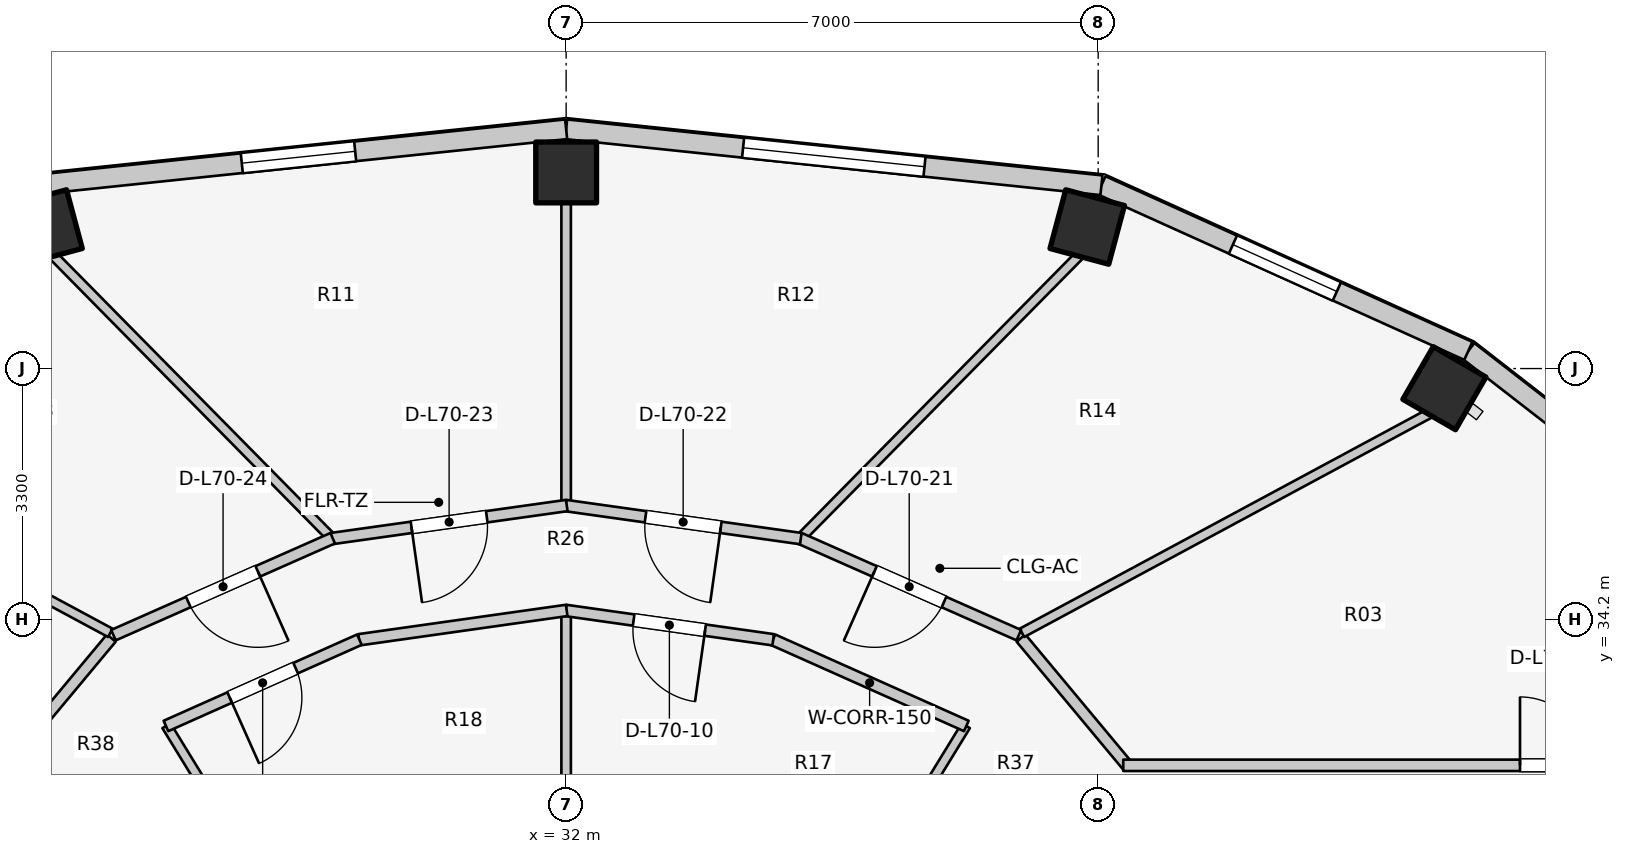
"""IFC4 building model, lengths in metres.
Left out: names, types, materials, properties, quantities, classifications, styles, units other than length and angle.
Written with IfcOpenShell. Run it as: python <this file> out.ifc"""

import sys

from ifc_helpers import new_model, si_unit, direction, frame, frame_2d, origin, origin_2d, place, context, subcontext, project, spatial, rectangle, extrude, element, fill, save


model = new_model("IFC4")
c1 = context("Model", 3, precision=1e-05, world=origin(), true_north=direction((0.0, 1.0)))
c2 = subcontext(c1, "Body", "Model", "MODEL_VIEW")
j1 = project(units=[si_unit("LENGTHUNIT", "METRE"), si_unit("PLANEANGLEUNIT", "RADIAN")], contexts=[c1])
p1 = place(None, origin())
s1 = spatial("IfcSite", under=j1, at=p1, CompositionType="ELEMENT")
p2 = place(p1, origin())
s2 = spatial("IfcBuilding", under=s1, at=p2, CompositionType="ELEMENT")
p3 = place(p2, frame((0.0, 0.0, 229.5)))
s3 = spatial("IfcBuildingStorey", under=s2, at=p3, CompositionType="ELEMENT", Elevation=229.5)
for number, where, z_axis, x_axis in (
    (1, (43.555, 37.241, 0.0), (0.0, 0.0, 1.0), (0.5, 0.866, 0.0)),
    (2, (38.856, 39.362, 0.0), (0.0, 0.0, 1.0), (0.259, 0.966, 0.0)),
    (3, (32.0, 40.08, 0.0), (0.0, 0.0, 1.0), (0.0, 1.0, 0.0)),
    (4, (25.144, 39.362, 0.0), (0.0, 0.0, 1.0), (-0.259, 0.966, 0.0)),
):
    element("IfcColumn", number, at=place(p3, frame(where, z_axis=z_axis, x_axis=x_axis)), inside=s3, PredefinedType="COLUMN", context=c2, shape_type="SweptSolid", body=[
        extrude(rectangle(XDim=0.8, YDim=0.8, at=origin_2d()), origin(), (0.0, 0.0, 1.0), 3.1),
    ])
p4 = place(p3, frame((47.558, 34.872, 0.0), z_axis=(0.0, 0.0, 1.0), x_axis=(-0.790126214723, 0.612944177563, 0.0)))
e5 = element("IfcWall", 5, at=p4, inside=s3, PredefinedType="STANDARD", context=c2, shape_type="SweptSolid", body=[
    extrude(rectangle(XDim=4.667, YDim=0.26, at=frame_2d((2.333, 0.0))), origin(), (0.0, 0.0, 1.0), 2.85),
])
p5 = place(p3, frame((43.87, 37.733, 0.0), z_axis=(0.0, 0.0, 1.0), x_axis=(-0.911427484938, 0.411460738952, 0.0)))
e6 = element("IfcWall", 6, at=p5, inside=s3, PredefinedType="STANDARD", context=c2, shape_type="SweptSolid", body=[
    extrude(rectangle(XDim=5.296, YDim=0.26, at=frame_2d((2.648, 0.0))), origin(), (0.0, 0.0, 1.0), 2.85),
])
p6 = place(p5, frame((1.898, 0.0, 0.75)))
e7 = element("IfcOpeningElement", 7, at=p6, cuts=e6, PredefinedType="OPENING", context=c2, shape_type="SweptSolid", body=[
    extrude(rectangle(XDim=1.5, YDim=1.6, at=frame_2d((0.75, 0.8))), frame((0.0, 0.14, 0.0), z_axis=(0.0, -1.0, 0.0), x_axis=(1.0, 0.0, 0.0)), (0.0, 0.0, 1.0), 0.28),
])
p7 = place(p3, frame((39.043, 39.912, 0.0), z_axis=(0.0, 0.0, 1.0), x_axis=(-0.994582822721, 0.103947144014, 0.0)))
e8 = element("IfcWall", 8, at=p7, inside=s3, PredefinedType="STANDARD", context=c2, shape_type="SweptSolid", body=[
    extrude(rectangle(XDim=7.081, YDim=0.26, at=frame_2d((3.541, 0.0))), origin(), (0.0, 0.0, 1.0), 2.85),
])
p8 = place(p7, frame((2.341, 0.0, 0.75)))
e9 = element("IfcOpeningElement", 9, at=p8, cuts=e8, PredefinedType="OPENING", context=c2, shape_type="SweptSolid", body=[
    extrude(rectangle(XDim=2.4, YDim=1.7, at=frame_2d((1.2, 0.85))), frame((0.0, 0.14, 0.0), z_axis=(0.0, -1.0, 0.0), x_axis=(1.0, 0.0, 0.0)), (0.0, 0.0, 1.0), 0.28),
])
p9 = place(p3, frame((32.0, 40.648, 0.0), z_axis=(0.0, 0.0, 1.0), x_axis=(-0.994582822721, -0.103947144014, 0.0)))
e10 = element("IfcWall", 10, at=p9, inside=s3, PredefinedType="STANDARD", context=c2, shape_type="SweptSolid", body=[
    extrude(rectangle(XDim=7.081, YDim=0.26, at=frame_2d((3.541, 0.0))), origin(), (0.0, 0.0, 1.0), 2.85),
])
p10 = place(p9, frame((2.791, 0.0, 0.75)))
e11 = element("IfcOpeningElement", 11, at=p10, cuts=e10, PredefinedType="OPENING", context=c2, shape_type="SweptSolid", body=[
    extrude(rectangle(XDim=1.5, YDim=1.6, at=frame_2d((0.75, 0.8))), frame((0.0, 0.14, 0.0), z_axis=(0.0, -1.0, 0.0), x_axis=(1.0, 0.0, 0.0)), (0.0, 0.0, 1.0), 0.28),
])
p11 = place(p3, frame((35.55, 30.015, 0.0), z_axis=(0.0, 0.0, 1.0), x_axis=(0.522763432117, 0.852477796802, 0.0)))
e12 = element("IfcWall", 12, at=p11, inside=s3, PredefinedType="PARTITIONING", context=c2, shape_type="SweptSolid", body=[
    extrude(rectangle(XDim=3.269, YDim=0.125, at=frame_2d((1.635, 0.0))), origin(), (0.0, 0.0, 1.0), 2.376),
])
p12 = place(p3, frame((32.0, 31.1, 0.0), z_axis=(0.0, 0.0, 1.0), x_axis=(0.0, 1.0, 0.0)))
e13 = element("IfcWall", 13, at=p12, inside=s3, PredefinedType="PARTITIONING", context=c2, shape_type="SweptSolid", body=[
    extrude(rectangle(XDim=3.218, YDim=0.125, at=frame_2d((1.609, 0.0))), origin(), (0.0, 0.0, 1.0), 2.376),
])
p13 = place(p3, frame((28.45, 30.015, 0.0), z_axis=(0.0, 0.0, 1.0), x_axis=(-0.522763432117, 0.852477796802, 0.0)))
e14 = element("IfcWall", 14, at=p13, inside=s3, PredefinedType="PARTITIONING", context=c2, shape_type="SweptSolid", body=[
    extrude(rectangle(XDim=3.269, YDim=0.125, at=frame_2d((1.635, 0.0))), origin(), (0.0, 0.0, 1.0), 2.376),
])
p14 = place(p3, frame((37.265, 32.798, 0.0), z_axis=(0.0, 0.0, 1.0), x_axis=(-0.913254317828, 0.407389924971, 0.0)))
e15 = element("IfcWall", 15, at=p14, inside=s3, PredefinedType="PARTITIONING", context=c2, shape_type="SweptSolid", body=[
    extrude(rectangle(XDim=2.787, YDim=0.15, at=frame_2d((1.393, 0.0))), origin(), (0.0, 0.0, 1.0), 2.376),
])
p15 = place(p3, frame((34.724, 33.932, 0.0), z_axis=(0.0, 0.0, 1.0), x_axis=(-0.990150268487, 0.140008734782, 0.0)))
e16 = element("IfcWall", 16, at=p15, inside=s3, PredefinedType="PARTITIONING", context=c2, shape_type="SweptSolid", body=[
    extrude(rectangle(XDim=2.759, YDim=0.15, at=frame_2d((1.379, 0.0))), origin(), (0.0, 0.0, 1.0), 2.376),
])
p16 = place(p15, frame((0.904, 0.0, 0.0)))
e17 = element("IfcOpeningElement", 17, at=p16, cuts=e16, PredefinedType="OPENING", context=c2, shape_type="SweptSolid", body=[
    extrude(rectangle(XDim=0.95, YDim=2.1, at=frame_2d((0.475, 1.05))), frame((0.0, 0.085, 0.0), z_axis=(0.0, -1.0, 0.0), x_axis=(1.0, 0.0, 0.0)), (0.0, 0.0, 1.0), 0.17),
])
p17 = place(p3, frame((32.007, 34.318, 0.0), z_axis=(0.0, 0.0, 1.0), x_axis=(-0.990150268487, -0.140008734782, 0.0)))
e18 = element("IfcWall", 18, at=p17, inside=s3, PredefinedType="PARTITIONING", context=c2, shape_type="SweptSolid", body=[
    extrude(rectangle(XDim=2.759, YDim=0.15, at=frame_2d((1.379, 0.0))), origin(), (0.0, 0.0, 1.0), 2.376),
])
p18 = place(p3, frame((29.28, 33.933, 0.0), z_axis=(0.0, 0.0, 1.0), x_axis=(-0.913254317828, -0.407389924971, 0.0)))
e19 = element("IfcWall", 19, at=p18, inside=s3, PredefinedType="PARTITIONING", context=c2, shape_type="SweptSolid", body=[
    extrude(rectangle(XDim=2.787, YDim=0.15, at=frame_2d((1.393, 0.0))), origin(), (0.0, 0.0, 1.0), 2.376),
])
p19 = place(p18, frame((0.918, 0.0, 0.0)))
e20 = element("IfcOpeningElement", 20, at=p19, cuts=e19, PredefinedType="OPENING", context=c2, shape_type="SweptSolid", body=[
    extrude(rectangle(XDim=0.95, YDim=2.1, at=frame_2d((0.475, 1.05))), frame((0.0, 0.085, 0.0), z_axis=(0.0, -1.0, 0.0), x_axis=(1.0, 0.0, 0.0)), (0.0, 0.0, 1.0), 0.17),
])
p20 = place(p3, frame((37.984, 33.955, 0.0), z_axis=(0.0, 0.0, 1.0), x_axis=(0.64030392053, -0.76812166312, 0.0)))
e21 = element("IfcWall", 21, at=p20, inside=s3, PredefinedType="PARTITIONING", context=c2, shape_type="SweptSolid", body=[
    extrude(rectangle(XDim=2.21, YDim=0.15, at=frame_2d((1.105, 0.0))), origin(), (0.0, 0.0, 1.0), 2.376),
])
p21 = place(p3, frame((39.33, 32.28, 0.0), z_axis=(0.0, 0.0, 1.0), x_axis=(1.0, 0.0, 0.0)))
e22 = element("IfcWall", 22, at=p21, inside=s3, PredefinedType="PARTITIONING", context=c2, shape_type="SweptSolid", body=[
    extrude(rectangle(XDim=7.52, YDim=0.15, at=frame_2d((3.76, 0.0))), origin(), (0.0, 0.0, 1.0), 2.376),
])
p22 = place(p21, frame((5.22, 0.0, 0.0)))
e23 = element("IfcOpeningElement", 23, at=p22, cuts=e22, PredefinedType="OPENING", context=c2, shape_type="SweptSolid", body=[
    extrude(rectangle(XDim=0.9, YDim=2.1, at=frame_2d((0.45, 1.05))), frame((0.0, 0.085, 0.0), z_axis=(0.0, -1.0, 0.0), x_axis=(1.0, 0.0, 0.0)), (0.0, 0.0, 1.0), 0.17),
])
p23 = place(p3, frame((26.016, 33.955, 0.0), z_axis=(0.0, 0.0, 1.0), x_axis=(-0.64030392053, -0.76812166312, 0.0)))
e24 = element("IfcWall", 24, at=p23, inside=s3, PredefinedType="PARTITIONING", context=c2, shape_type="SweptSolid", body=[
    extrude(rectangle(XDim=2.21, YDim=0.15, at=frame_2d((1.105, 0.0))), origin(), (0.0, 0.0, 1.0), 2.376),
])
p24 = place(p3, frame((37.997, 34.023, 0.0), z_axis=(0.0, 0.0, 1.0), x_axis=(0.880531534665, 0.473987569943, 0.0)))
e25 = element("IfcWall", 25, at=p24, inside=s3, PredefinedType="PARTITIONING", context=c2, shape_type="SweptSolid", body=[
    extrude(rectangle(XDim=6.096, YDim=0.125, at=frame_2d((3.048, 0.0))), origin(), (0.0, 0.0, 1.0), 2.376),
])
p25 = place(p3, frame((35.118, 35.304, 0.0), z_axis=(0.0, 0.0, 1.0), x_axis=(0.702191571271, 0.711988059756, 0.0)))
e26 = element("IfcWall", 26, at=p25, inside=s3, PredefinedType="PARTITIONING", context=c2, shape_type="SweptSolid", body=[
    extrude(rectangle(XDim=5.184, YDim=0.125, at=frame_2d((2.592, 0.0))), origin(), (0.0, 0.0, 1.0), 2.376),
])
p26 = place(p3, frame((32.0, 35.753, 0.0), z_axis=(0.0, 0.0, 1.0), x_axis=(0.0, 1.0, 0.0)))
e27 = element("IfcWall", 27, at=p26, inside=s3, PredefinedType="PARTITIONING", context=c2, shape_type="SweptSolid", body=[
    extrude(rectangle(XDim=3.947, YDim=0.125, at=frame_2d((1.974, 0.0))), origin(), (0.0, 0.0, 1.0), 2.376),
])
p27 = place(p3, frame((28.882, 35.304, 0.0), z_axis=(0.0, 0.0, 1.0), x_axis=(-0.702191571271, 0.711988059756, 0.0)))
e28 = element("IfcWall", 28, at=p27, inside=s3, PredefinedType="PARTITIONING", context=c2, shape_type="SweptSolid", body=[
    extrude(rectangle(XDim=5.184, YDim=0.125, at=frame_2d((2.592, 0.0))), origin(), (0.0, 0.0, 1.0), 2.376),
])
p28 = place(p3, frame((26.003, 34.023, 0.0), z_axis=(0.0, 0.0, 1.0), x_axis=(-0.880531534665, 0.473987569943, 0.0)))
e29 = element("IfcWall", 29, at=p28, inside=s3, PredefinedType="PARTITIONING", context=c2, shape_type="SweptSolid", body=[
    extrude(rectangle(XDim=6.096, YDim=0.125, at=frame_2d((3.048, 0.0))), origin(), (0.0, 0.0, 1.0), 2.376),
])
p29 = place(p3, frame((37.956, 33.992, 0.0), z_axis=(0.0, 0.0, 1.0), x_axis=(-0.914642679993, 0.404263240891, 0.0)))
e30 = element("IfcWall", 30, at=p29, inside=s3, PredefinedType="PARTITIONING", context=c2, shape_type="SweptSolid", body=[
    extrude(rectangle(XDim=3.154, YDim=0.15, at=frame_2d((1.577, 0.0))), origin(), (0.0, 0.0, 1.0), 2.376),
])
p30 = place(p29, frame((1.077, 0.0, 0.0)))
e31 = element("IfcOpeningElement", 31, at=p30, cuts=e30, PredefinedType="OPENING", context=c2, shape_type="SweptSolid", body=[
    extrude(rectangle(XDim=1.0, YDim=2.1, at=frame_2d((0.5, 1.05))), frame((0.0, 0.085, 0.0), z_axis=(0.0, -1.0, 0.0), x_axis=(1.0, 0.0, 0.0)), (0.0, 0.0, 1.0), 0.17),
])
p31 = place(p3, frame((35.087, 35.263, 0.0), z_axis=(0.0, 0.0, 1.0), x_axis=(-0.990268690673, 0.139168675614, 0.0)))
e32 = element("IfcWall", 32, at=p31, inside=s3, PredefinedType="PARTITIONING", context=c2, shape_type="SweptSolid", body=[
    extrude(rectangle(XDim=3.126, YDim=0.15, at=frame_2d((1.563, 0.0))), origin(), (0.0, 0.0, 1.0), 2.376),
])
p32 = place(p31, frame((1.063, 0.0, 0.0)))
e33 = element("IfcOpeningElement", 33, at=p32, cuts=e32, PredefinedType="OPENING", context=c2, shape_type="SweptSolid", body=[
    extrude(rectangle(XDim=1.0, YDim=2.1, at=frame_2d((0.5, 1.05))), frame((0.0, 0.085, 0.0), z_axis=(0.0, -1.0, 0.0), x_axis=(1.0, 0.0, 0.0)), (0.0, 0.0, 1.0), 0.17),
])
p33 = place(p3, frame((32.008, 35.698, 0.0), z_axis=(0.0, 0.0, 1.0), x_axis=(-0.990268690673, -0.139168675614, 0.0)))
e34 = element("IfcWall", 34, at=p33, inside=s3, PredefinedType="PARTITIONING", context=c2, shape_type="SweptSolid", body=[
    extrude(rectangle(XDim=3.126, YDim=0.15, at=frame_2d((1.563, 0.0))), origin(), (0.0, 0.0, 1.0), 2.376),
])
p34 = place(p33, frame((1.063, 0.0, 0.0)))
e35 = element("IfcOpeningElement", 35, at=p34, cuts=e34, PredefinedType="OPENING", context=c2, shape_type="SweptSolid", body=[
    extrude(rectangle(XDim=1.0, YDim=2.1, at=frame_2d((0.5, 1.05))), frame((0.0, 0.085, 0.0), z_axis=(0.0, -1.0, 0.0), x_axis=(1.0, 0.0, 0.0)), (0.0, 0.0, 1.0), 0.17),
])
p35 = place(p3, frame((28.929, 35.268, 0.0), z_axis=(0.0, 0.0, 1.0), x_axis=(-0.914642679993, -0.404263240891, 0.0)))
e36 = element("IfcWall", 36, at=p35, inside=s3, PredefinedType="PARTITIONING", context=c2, shape_type="SweptSolid", body=[
    extrude(rectangle(XDim=3.154, YDim=0.15, at=frame_2d((1.577, 0.0))), origin(), (0.0, 0.0, 1.0), 2.376),
])
p36 = place(p35, frame((1.077, 0.0, 0.0)))
e37 = element("IfcOpeningElement", 37, at=p36, cuts=e36, PredefinedType="OPENING", context=c2, shape_type="SweptSolid", body=[
    extrude(rectangle(XDim=1.0, YDim=2.1, at=frame_2d((0.5, 1.05))), frame((0.0, 0.085, 0.0), z_axis=(0.0, -1.0, 0.0), x_axis=(1.0, 0.0, 0.0)), (0.0, 0.0, 1.0), 0.17),
])
p37 = place(p6, origin())
e38 = element("IfcWindow", 38, at=p37, inside=s3, PartitioningType="SINGLE_PANEL", PredefinedType="WINDOW", context=c2, shape_type="SweptSolid", body=[
    extrude(rectangle(XDim=1.5, YDim=1.6, at=frame_2d((0.75, 0.8))), frame((0.0, 0.03, 0.0), z_axis=(0.0, -1.0, 0.0), x_axis=(1.0, 0.0, 0.0)), (0.0, 0.0, 1.0), 0.06),
])
fill(e7, e38)
p38 = place(p8, origin())
e39 = element("IfcWindow", 39, at=p38, inside=s3, PartitioningType="SINGLE_PANEL", PredefinedType="WINDOW", context=c2, shape_type="SweptSolid", body=[
    extrude(rectangle(XDim=2.4, YDim=1.7, at=frame_2d((1.2, 0.85))), frame((0.0, 0.03, 0.0), z_axis=(0.0, -1.0, 0.0), x_axis=(1.0, 0.0, 0.0)), (0.0, 0.0, 1.0), 0.06),
])
fill(e9, e39)
p39 = place(p10, origin())
e40 = element("IfcWindow", 40, at=p39, inside=s3, PartitioningType="SINGLE_PANEL", PredefinedType="WINDOW", context=c2, shape_type="SweptSolid", body=[
    extrude(rectangle(XDim=1.5, YDim=1.6, at=frame_2d((0.75, 0.8))), frame((0.0, 0.03, 0.0), z_axis=(0.0, -1.0, 0.0), x_axis=(1.0, 0.0, 0.0)), (0.0, 0.0, 1.0), 0.06),
])
fill(e11, e40)
p40 = place(p16, origin())
e41 = element("IfcDoor", 41, at=p40, inside=s3, OperationType="SINGLE_SWING_LEFT", PredefinedType="DOOR", context=c2, shape_type="SweptSolid", body=[
    extrude(rectangle(XDim=0.95, YDim=2.1, at=frame_2d((0.475, 1.05))), frame((0.0, 0.025, 0.0), z_axis=(0.0, -1.0, 0.0), x_axis=(1.0, 0.0, 0.0)), (0.0, 0.0, 1.0), 0.05),
])
fill(e17, e41)
p41 = place(p19, origin())
e42 = element("IfcDoor", 42, at=p41, inside=s3, OperationType="SINGLE_SWING_RIGHT", PredefinedType="DOOR", context=c2, shape_type="SweptSolid", body=[
    extrude(rectangle(XDim=0.95, YDim=2.1, at=frame_2d((0.475, 1.05))), frame((0.0, 0.025, 0.0), z_axis=(0.0, -1.0, 0.0), x_axis=(1.0, 0.0, 0.0)), (0.0, 0.0, 1.0), 0.05),
])
fill(e20, e42)
p42 = place(p22, origin())
e43 = element("IfcDoor", 43, at=p42, inside=s3, OperationType="SINGLE_SWING_LEFT", PredefinedType="DOOR", context=c2, shape_type="SweptSolid", body=[
    extrude(rectangle(XDim=0.9, YDim=2.1, at=frame_2d((0.45, 1.05))), frame((0.0, 0.025, 0.0), z_axis=(0.0, -1.0, 0.0), x_axis=(1.0, 0.0, 0.0)), (0.0, 0.0, 1.0), 0.05),
])
fill(e23, e43)
p43 = place(p30, origin())
e44 = element("IfcDoor", 44, at=p43, inside=s3, OperationType="SINGLE_SWING_RIGHT", PredefinedType="DOOR", context=c2, shape_type="SweptSolid", body=[
    extrude(rectangle(XDim=1.0, YDim=2.1, at=frame_2d((0.5, 1.05))), frame((0.0, 0.025, 0.0), z_axis=(0.0, -1.0, 0.0), x_axis=(1.0, 0.0, 0.0)), (0.0, 0.0, 1.0), 0.05),
])
fill(e31, e44)
p44 = place(p32, origin())
e45 = element("IfcDoor", 45, at=p44, inside=s3, OperationType="SINGLE_SWING_LEFT", PredefinedType="DOOR", context=c2, shape_type="SweptSolid", body=[
    extrude(rectangle(XDim=1.0, YDim=2.1, at=frame_2d((0.5, 1.05))), frame((0.0, 0.025, 0.0), z_axis=(0.0, -1.0, 0.0), x_axis=(1.0, 0.0, 0.0)), (0.0, 0.0, 1.0), 0.05),
])
fill(e33, e45)
p45 = place(p34, origin())
e46 = element("IfcDoor", 46, at=p45, inside=s3, OperationType="SINGLE_SWING_RIGHT", PredefinedType="DOOR", context=c2, shape_type="SweptSolid", body=[
    extrude(rectangle(XDim=1.0, YDim=2.1, at=frame_2d((0.5, 1.05))), frame((0.0, 0.025, 0.0), z_axis=(0.0, -1.0, 0.0), x_axis=(1.0, 0.0, 0.0)), (0.0, 0.0, 1.0), 0.05),
])
fill(e35, e46)
p46 = place(p36, origin())
e47 = element("IfcDoor", 47, at=p46, inside=s3, OperationType="SINGLE_SWING_LEFT", PredefinedType="DOOR", context=c2, shape_type="SweptSolid", body=[
    extrude(rectangle(XDim=1.0, YDim=2.1, at=frame_2d((0.5, 1.05))), frame((0.0, 0.025, 0.0), z_axis=(0.0, -1.0, 0.0), x_axis=(1.0, 0.0, 0.0)), (0.0, 0.0, 1.0), 0.05),
])
fill(e37, e47)
save(model, sys.argv[1])
